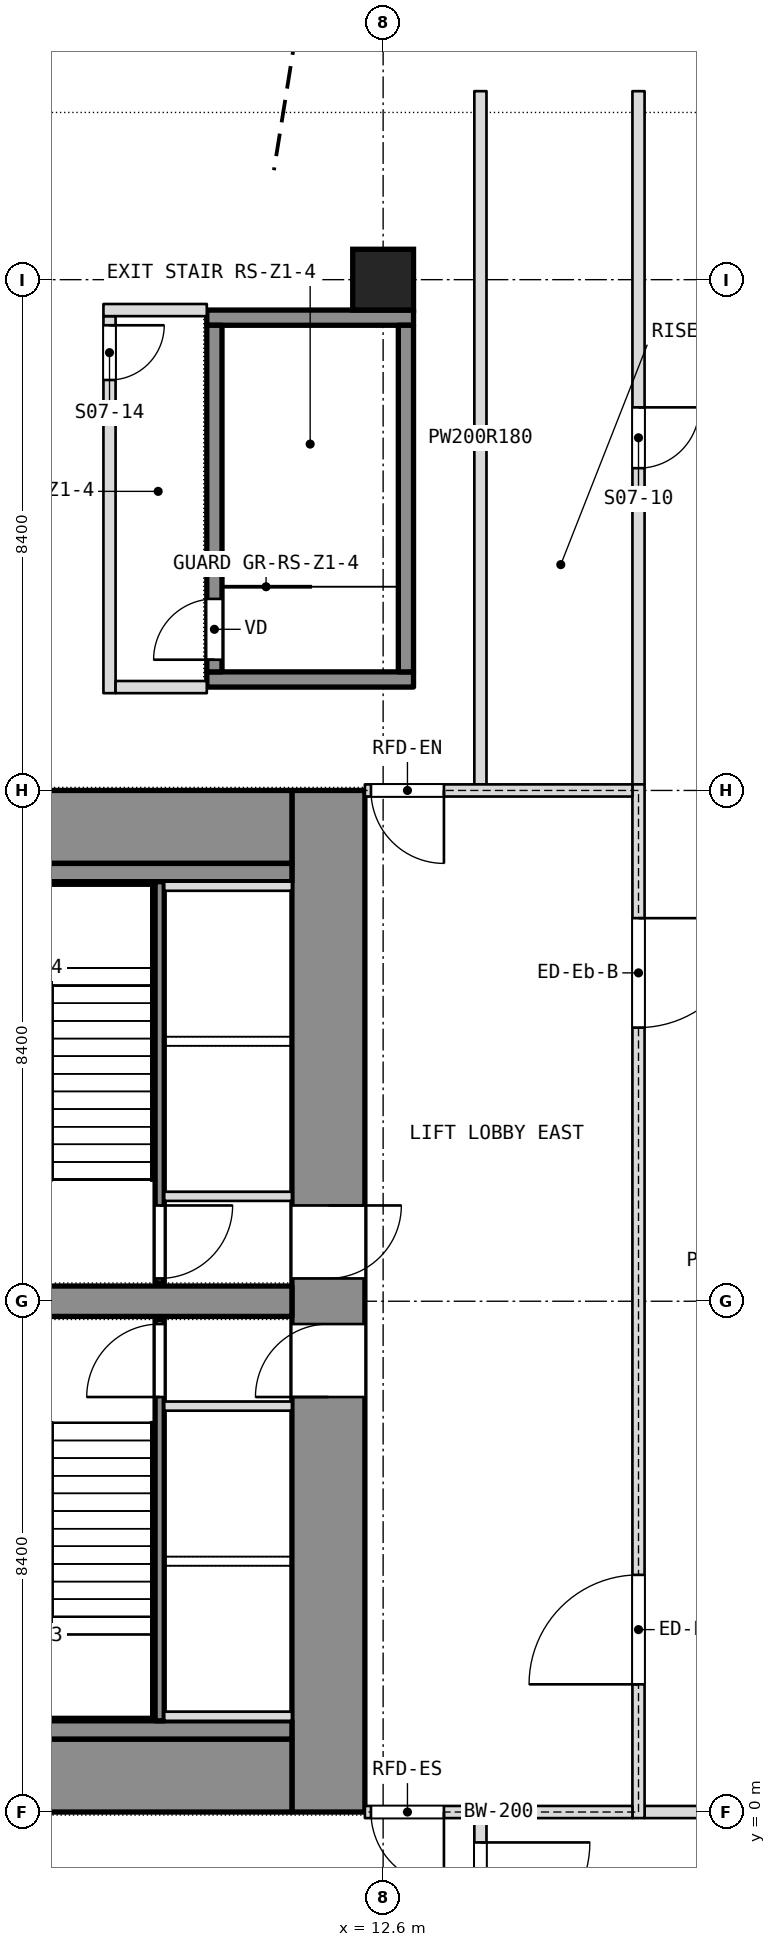
"""IFC4 building model, lengths in metres.
Left out: names, types, materials, properties, quantities, classifications, styles, units other than length and angle.
Written with IfcOpenShell. Run it as: python <this file> out.ifc"""

import sys

from ifc_helpers import new_model, si_unit, direction, frame, frame_2d, origin, origin_2d, place, context, subcontext, project, spatial, rectangle, extrude, element, fill, save


model = new_model("IFC4")
c1 = context("Model", 3, precision=1e-05, world=origin(), true_north=direction((0.0, 1.0)))
c2 = subcontext(c1, "Body", "Model", "MODEL_VIEW")
j1 = project(units=[si_unit("LENGTHUNIT", "METRE"), si_unit("PLANEANGLEUNIT", "RADIAN")], contexts=[c1])
p1 = place(None, origin())
s1 = spatial("IfcSite", under=j1, at=p1, CompositionType="ELEMENT")
p2 = place(p1, origin())
s2 = spatial("IfcBuilding", under=s1, at=p2, CompositionType="ELEMENT")
p3 = place(p2, frame((0.0, 0.0, 86.9)))
s3 = spatial("IfcBuildingStorey", under=s2, at=p3, CompositionType="ELEMENT", Elevation=86.9)
p4 = place(p3, frame((11.7, 0.0, 0.0), z_axis=(0.0, 0.0, 1.0), x_axis=(0.0, 1.0, 0.0)))
e1 = element("IfcWall", 1, at=p4, inside=s3, PredefinedType="SHEAR", context=c2, shape_type="SweptSolid", body=[
    extrude(rectangle(XDim=16.8, YDim=1.2, at=frame_2d((8.4, 0.0))), origin(), (0.0, 0.0, 1.0), 10.8),
])
p5 = place(p4, frame((6.825, 0.0, 0.0)))
e2 = element("IfcOpeningElement", 2, at=p5, cuts=e1, PredefinedType="OPENING", context=c2, shape_type="SweptSolid", body=[
    extrude(rectangle(XDim=1.2, YDim=2.1, at=frame_2d((0.6, 1.05))), frame((0.0, 0.6, 0.0), z_axis=(0.0, -1.0, 0.0), x_axis=(1.0, 0.0, 0.0)), (0.0, 0.0, 1.0), 1.2),
])
p6 = place(p4, frame((8.775, 0.0, 0.0)))
e3 = element("IfcOpeningElement", 3, at=p6, cuts=e1, PredefinedType="OPENING", context=c2, shape_type="SweptSolid", body=[
    extrude(rectangle(XDim=1.2, YDim=2.1, at=frame_2d((0.6, 1.05))), frame((0.0, 0.6, 0.0), z_axis=(0.0, -1.0, 0.0), x_axis=(1.0, 0.0, 0.0)), (0.0, 0.0, 1.0), 1.2),
])
p7 = place(p3, frame((-11.1, 0.6, 0.0), z_axis=(0.0, 0.0, 1.0), x_axis=(1.0, 0.0, 0.0)))
e4 = element("IfcWall", 4, at=p7, inside=s3, PredefinedType="SHEAR", context=c2, shape_type="SweptSolid", body=[
    extrude(rectangle(XDim=22.2, YDim=1.2, at=frame_2d((11.1, 0.0))), origin(), (0.0, 0.0, 1.0), 10.8),
])
p8 = place(p7, frame((10.85, 0.0, 0.0)))
e5 = element("IfcOpeningElement", 5, at=p8, cuts=e4, PredefinedType="OPENING", context=c2, shape_type="SweptSolid", body=[
    extrude(rectangle(XDim=1.4, YDim=2.1, at=frame_2d((0.7, 1.05))), frame((0.0, 0.6, 0.0), z_axis=(0.0, -1.0, 0.0), x_axis=(1.0, 0.0, 0.0)), (0.0, 0.0, 1.0), 1.2),
])
p9 = place(p3, frame((-11.1, 16.2, 0.0), z_axis=(0.0, 0.0, 1.0), x_axis=(1.0, 0.0, 0.0)))
e6 = element("IfcWall", 6, at=p9, inside=s3, PredefinedType="SHEAR", context=c2, shape_type="SweptSolid", body=[
    extrude(rectangle(XDim=22.2, YDim=1.2, at=frame_2d((11.1, 0.0))), origin(), (0.0, 0.0, 1.0), 10.8),
])
p10 = place(p9, frame((10.4, 0.0, 0.0)))
e7 = element("IfcOpeningElement", 7, at=p10, cuts=e6, PredefinedType="OPENING", context=c2, shape_type="SweptSolid", body=[
    extrude(rectangle(XDim=1.4, YDim=2.1, at=frame_2d((0.7, 1.05))), frame((0.0, 0.6, 0.0), z_axis=(0.0, -1.0, 0.0), x_axis=(1.0, 0.0, 0.0)), (0.0, 0.0, 1.0), 1.2),
])
p11 = place(p3, frame((4.45, 8.4, 0.0), z_axis=(0.0, 0.0, 1.0), x_axis=(1.0, 0.0, 0.0)))
e8 = element("IfcWall", 8, at=p11, inside=s3, PredefinedType="SHEAR", context=c2, shape_type="SweptSolid", body=[
    extrude(rectangle(XDim=6.65, YDim=0.5, at=frame_2d((3.325, 0.0))), origin(), (0.0, 0.0, 1.0), 10.8),
])
p12 = place(p3, frame((12.6, 25.2, 0.0), z_axis=(0.0, 0.0, 1.0), x_axis=(1.0, 0.0, 0.0)))
e9 = element("IfcColumn", 9, at=p12, inside=s3, PredefinedType="COLUMN", context=c2, shape_type="SweptSolid", body=[
    extrude(rectangle(XDim=1.0, YDim=1.0, at=origin_2d()), origin(), (0.0, 0.0, 1.0), 10.54),
])
p13 = place(p3, frame((16.8, 16.9, 0.0), z_axis=(0.0, 0.0, 1.0), x_axis=(0.0, 1.0, 0.0)))
e10 = element("IfcWall", 10, at=p13, inside=s3, PredefinedType="PARTITIONING", context=c2, shape_type="SweptSolid", body=[
    extrude(rectangle(XDim=11.4, YDim=0.2, at=frame_2d((5.7, 0.0))), origin(), (0.0, 0.0, 1.0), 10.14),
])
p14 = place(p13, frame((5.2, 0.0, 0.0)))
e11 = element("IfcOpeningElement", 11, at=p14, cuts=e10, PredefinedType="OPENING", context=c2, shape_type="SweptSolid", body=[
    extrude(rectangle(XDim=1.0, YDim=2.1, at=frame_2d((0.5, 1.05))), frame((0.0, 0.1, 0.0), z_axis=(0.0, -1.0, 0.0), x_axis=(1.0, 0.0, 0.0)), (0.0, 0.0, 1.0), 0.2),
])
p15 = place(p3, frame((14.2, -17.699, 0.0), z_axis=(0.0, 0.0, 1.0), x_axis=(0.0, 1.0, 0.0)))
e12 = element("IfcWall", 12, at=p15, inside=s3, PredefinedType="PARTITIONING", context=c2, shape_type="SweptSolid", body=[
    extrude(rectangle(XDim=17.599, YDim=0.2, at=frame_2d((8.799, 0.0))), origin(), (0.0, 0.0, 1.0), 10.54),
])
p16 = place(p15, frame((15.399, 0.0, 0.0)))
e13 = element("IfcOpeningElement", 13, at=p16, cuts=e12, PredefinedType="OPENING", context=c2, shape_type="SweptSolid", body=[
    extrude(rectangle(XDim=1.8, YDim=2.1, at=frame_2d((0.9, 1.05))), frame((0.0, 0.1, 0.0), z_axis=(0.0, -1.0, 0.0), x_axis=(1.0, 0.0, 0.0)), (0.0, 0.0, 1.0), 0.2),
])
p17 = place(p3, frame((14.2, 16.9, 0.0), z_axis=(0.0, 0.0, 1.0), x_axis=(0.0, 1.0, 0.0)))
e14 = element("IfcWall", 14, at=p17, inside=s3, PredefinedType="PARTITIONING", context=c2, shape_type="SweptSolid", body=[
    extrude(rectangle(XDim=11.4, YDim=0.2, at=frame_2d((5.7, 0.0))), origin(), (0.0, 0.0, 1.0), 10.54),
])
p18 = place(p3, frame((8.1, 18.4, 0.0), z_axis=(0.0, 0.0, 1.0), x_axis=(0.0, 1.0, 0.0)))
e15 = element("IfcWall", 15, at=p18, inside=s3, PredefinedType="PARTITIONING", context=c2, shape_type="SweptSolid", body=[
    extrude(rectangle(XDim=6.2, YDim=0.2, at=frame_2d((3.1, 0.0))), origin(), (0.0, 0.0, 1.0), 10.54),
])
p19 = place(p18, frame((5.15, 0.0, 0.0)))
e16 = element("IfcOpeningElement", 16, at=p19, cuts=e15, PredefinedType="OPENING", context=c2, shape_type="SweptSolid", body=[
    extrude(rectangle(XDim=0.9, YDim=2.1, at=frame_2d((0.45, 1.05))), frame((0.0, 0.1, 0.0), z_axis=(0.0, -1.0, 0.0), x_axis=(1.0, 0.0, 0.0)), (0.0, 0.0, 1.0), 0.2),
])
p20 = place(p3, frame((16.9, 0.0, 0.0), z_axis=(0.0, 0.0, 1.0), x_axis=(1.0, 0.0, 0.0)))
e17 = element("IfcWall", 17, at=p20, inside=s3, PredefinedType="PARTITIONING", context=c2, shape_type="SweptSolid", body=[
    extrude(rectangle(XDim=4.0, YDim=0.2, at=frame_2d((2.0, 0.0))), origin(), (0.0, 0.0, 1.0), 10.09),
])
p21 = place(p3, frame((8.2, 18.5, 0.0), z_axis=(0.0, 0.0, 1.0), x_axis=(1.0, 0.0, 0.0)))
e18 = element("IfcWall", 18, at=p21, inside=s3, PredefinedType="PARTITIONING", context=c2, shape_type="SweptSolid", body=[
    extrude(rectangle(XDim=1.5, YDim=0.2, at=frame_2d((0.75, 0.0))), origin(), (0.0, 0.0, 1.0), 10.54),
])
p22 = place(p3, frame((8.0, 24.7, 0.0), z_axis=(0.0, 0.0, 1.0), x_axis=(1.0, 0.0, 0.0)))
e19 = element("IfcWall", 19, at=p22, inside=s3, PredefinedType="PARTITIONING", context=c2, shape_type="SweptSolid", body=[
    extrude(rectangle(XDim=1.7, YDim=0.2, at=frame_2d((0.85, 0.0))), origin(), (0.0, 0.0, 1.0), 10.54),
])
p23 = place(p3, frame((1.15, 1.35, 0.0), z_axis=(0.0, 0.0, 1.0), x_axis=(1.0, 0.0, 0.0)))
e20 = element("IfcWall", 20, at=p23, inside=s3, PredefinedType="PARTITIONING", context=c2, shape_type="SweptSolid", body=[
    extrude(rectangle(XDim=9.95, YDim=0.3, at=frame_2d((4.975, 0.0))), origin(), (0.0, 0.0, 1.0), 10.54),
])
p24 = place(p3, frame((0.9, 15.45, 0.0), z_axis=(0.0, 0.0, 1.0), x_axis=(1.0, 0.0, 0.0)))
e21 = element("IfcWall", 21, at=p24, inside=s3, PredefinedType="PARTITIONING", context=c2, shape_type="SweptSolid", body=[
    extrude(rectangle(XDim=10.2, YDim=0.3, at=frame_2d((5.1, 0.0))), origin(), (0.0, 0.0, 1.0), 10.54),
])
p25 = place(p3, frame((8.925, 1.5, 0.0), z_axis=(0.0, 0.0, 1.0), x_axis=(0.0, 1.0, 0.0)))
e22 = element("IfcWall", 22, at=p25, inside=s3, PredefinedType="SHEAR", context=c2, shape_type="SweptSolid", body=[
    extrude(rectangle(XDim=6.6, YDim=0.15, at=frame_2d((3.3, 0.0))), origin(), (0.0, 0.0, 1.0), 10.54),
])
p26 = place(p25, frame((5.325, 0.0, 0.0)))
e23 = element("IfcOpeningElement", 23, at=p26, cuts=e22, PredefinedType="OPENING", context=c2, shape_type="SweptSolid", body=[
    extrude(rectangle(XDim=1.2, YDim=2.1, at=frame_2d((0.6, 1.05))), frame((0.0, 0.075, 0.0), z_axis=(0.0, -1.0, 0.0), x_axis=(1.0, 0.0, 0.0)), (0.0, 0.0, 1.0), 0.15),
])
for number, where, z_axis, x_axis in (
    (24, (9.0, 6.675, 0.0), (0.0, 0.0, 1.0), (1.0, 0.0, 0.0)),
    (25, (9.0, 1.575, 0.0), (0.0, 0.0, 1.0), (1.0, 0.0, 0.0)),
):
    element("IfcWall", number, at=place(p3, frame(where, z_axis=z_axis, x_axis=x_axis)), inside=s3, PredefinedType="SHEAR", context=c2, shape_type="SweptSolid", body=[
        extrude(rectangle(XDim=2.1, YDim=0.15, at=frame_2d((1.05, 0.0))), origin(), (0.0, 0.0, 1.0), 10.8),
    ])
p27 = place(p3, frame((8.925, 8.7, 0.0), z_axis=(0.0, 0.0, 1.0), x_axis=(0.0, 1.0, 0.0)))
e26 = element("IfcWall", 26, at=p27, inside=s3, PredefinedType="SHEAR", context=c2, shape_type="SweptSolid", body=[
    extrude(rectangle(XDim=6.6, YDim=0.15, at=frame_2d((3.3, 0.0))), origin(), (0.0, 0.0, 1.0), 10.54),
])
p28 = place(p27, frame((0.075, 0.0, 0.0)))
e27 = element("IfcOpeningElement", 27, at=p28, cuts=e26, PredefinedType="OPENING", context=c2, shape_type="SweptSolid", body=[
    extrude(rectangle(XDim=1.2, YDim=2.1, at=frame_2d((0.6, 1.05))), frame((0.0, 0.075, 0.0), z_axis=(0.0, -1.0, 0.0), x_axis=(1.0, 0.0, 0.0)), (0.0, 0.0, 1.0), 0.15),
])
for number, where, z_axis, x_axis in (
    (28, (9.0, 10.125, 0.0), (0.0, 0.0, 1.0), (1.0, 0.0, 0.0)),
    (29, (9.0, 15.225, 0.0), (0.0, 0.0, 1.0), (1.0, 0.0, 0.0)),
):
    element("IfcWall", number, at=place(p3, frame(where, z_axis=z_axis, x_axis=x_axis)), inside=s3, PredefinedType="SHEAR", context=c2, shape_type="SweptSolid", body=[
        extrude(rectangle(XDim=2.1, YDim=0.15, at=frame_2d((1.05, 0.0))), origin(), (0.0, 0.0, 1.0), 10.8),
    ])
p29 = place(p3, frame((16.8, -0.1, 0.0), z_axis=(0.0, 0.0, 1.0), x_axis=(0.0, 1.0, 0.0)))
e30 = element("IfcWall", 30, at=p29, inside=s3, PredefinedType="PARTITIONING", context=c2, shape_type="SweptSolid", body=[
    extrude(rectangle(XDim=17.0, YDim=0.2, at=frame_2d((8.5, 0.0))), origin(), (0.0, 0.0, 1.0), 10.54),
])
p30 = place(p29, frame((2.2, 0.0, 0.0)))
e31 = element("IfcOpeningElement", 31, at=p30, cuts=e30, PredefinedType="OPENING", context=c2, shape_type="SweptSolid", body=[
    extrude(rectangle(XDim=1.8, YDim=2.1, at=frame_2d((0.9, 1.05))), frame((0.0, 0.1, 0.0), z_axis=(0.0, -1.0, 0.0), x_axis=(1.0, 0.0, 0.0)), (0.0, 0.0, 1.0), 0.2),
])
p31 = place(p29, frame((13.0, 0.0, 0.0)))
e32 = element("IfcOpeningElement", 32, at=p31, cuts=e30, PredefinedType="OPENING", context=c2, shape_type="SweptSolid", body=[
    extrude(rectangle(XDim=1.8, YDim=2.1, at=frame_2d((0.9, 1.05))), frame((0.0, 0.1, 0.0), z_axis=(0.0, -1.0, 0.0), x_axis=(1.0, 0.0, 0.0)), (0.0, 0.0, 1.0), 0.2),
])
p32 = place(p3, frame((12.3, 0.0, 0.0), z_axis=(0.0, 0.0, 1.0), x_axis=(1.0, 0.0, 0.0)))
e33 = element("IfcWall", 33, at=p32, inside=s3, PredefinedType="PARTITIONING", context=c2, shape_type="SweptSolid", body=[
    extrude(rectangle(XDim=4.4, YDim=0.2, at=frame_2d((2.2, 0.0))), origin(), (0.0, 0.0, 1.0), 10.09),
])
p33 = place(p32, frame((0.1, 0.0, 0.0)))
e34 = element("IfcOpeningElement", 34, at=p33, cuts=e33, PredefinedType="OPENING", context=c2, shape_type="SweptSolid", body=[
    extrude(rectangle(XDim=1.2, YDim=2.1, at=frame_2d((0.6, 1.05))), frame((0.0, 0.1, 0.0), z_axis=(0.0, -1.0, 0.0), x_axis=(1.0, 0.0, 0.0)), (0.0, 0.0, 1.0), 0.2),
])
p34 = place(p3, frame((12.3, 16.8, 0.0), z_axis=(0.0, 0.0, 1.0), x_axis=(1.0, 0.0, 0.0)))
e35 = element("IfcWall", 35, at=p34, inside=s3, PredefinedType="PARTITIONING", context=c2, shape_type="SweptSolid", body=[
    extrude(rectangle(XDim=4.4, YDim=0.2, at=frame_2d((2.2, 0.0))), origin(), (0.0, 0.0, 1.0), 10.09),
])
p35 = place(p34, frame((0.1, 0.0, 0.0)))
e36 = element("IfcOpeningElement", 36, at=p35, cuts=e35, PredefinedType="OPENING", context=c2, shape_type="SweptSolid", body=[
    extrude(rectangle(XDim=1.2, YDim=2.1, at=frame_2d((0.6, 1.05))), frame((0.0, 0.1, 0.0), z_axis=(0.0, -1.0, 0.0), x_axis=(1.0, 0.0, 0.0)), (0.0, 0.0, 1.0), 0.2),
])
for number, where, z_axis, x_axis in (
    (37, (9.7, 18.625, 0.1), (0.0, 0.0, 1.0), (1.0, 0.0, 0.0)),
    (38, (9.7, 24.575, 0.1), (0.0, 0.0, 1.0), (1.0, 0.0, 0.0)),
):
    element("IfcWall", number, at=place(p3, frame(where, z_axis=z_axis, x_axis=x_axis)), inside=s3, PredefinedType="SHEAR", context=c2, shape_type="SweptSolid", body=[
        extrude(rectangle(XDim=3.4, YDim=0.25, at=frame_2d((1.7, 0.0))), origin(), (0.0, 0.0, 1.0), 10.44),
    ])
p36 = place(p3, frame((9.825, 18.75, 0.1), z_axis=(0.0, 0.0, 1.0), x_axis=(0.0, 1.0, 0.0)))
e39 = element("IfcWall", 39, at=p36, inside=s3, PredefinedType="SHEAR", context=c2, shape_type="SweptSolid", body=[
    extrude(rectangle(XDim=5.7, YDim=0.25, at=frame_2d((2.85, 0.0))), origin(), (0.0, 0.0, 1.0), 10.44),
])
p37 = place(p36, frame((0.2, 0.0, 0.0)))
e40 = element("IfcOpeningElement", 40, at=p37, cuts=e39, PredefinedType="OPENING", context=c2, shape_type="SweptSolid", body=[
    extrude(rectangle(XDim=1.0, YDim=2.1, at=frame_2d((0.5, 1.05))), frame((0.0, 0.125, 0.0), z_axis=(0.0, -1.0, 0.0), x_axis=(1.0, 0.0, 0.0)), (0.0, 0.0, 1.0), 0.25),
])
p38 = place(p3, frame((12.975, 18.75, 0.1), z_axis=(0.0, 0.0, 1.0), x_axis=(0.0, 1.0, 0.0)))
e41 = element("IfcWall", 41, at=p38, inside=s3, PredefinedType="SHEAR", context=c2, shape_type="SweptSolid", body=[
    extrude(rectangle(XDim=5.7, YDim=0.25, at=frame_2d((2.85, 0.0))), origin(), (0.0, 0.0, 1.0), 10.44),
])
p39 = place(p14, origin())
e42 = element("IfcDoor", 42, at=p39, inside=s3, OperationType="SINGLE_SWING_RIGHT", PredefinedType="DOOR", context=c2, shape_type="SweptSolid", body=[
    extrude(rectangle(XDim=1.0, YDim=2.1, at=frame_2d((0.5, 1.05))), frame((0.0, 0.025, 0.0), z_axis=(0.0, -1.0, 0.0), x_axis=(1.0, 0.0, 0.0)), (0.0, 0.0, 1.0), 0.05),
])
fill(e11, e42)
p40 = place(p16, origin())
e43 = element("IfcDoor", 43, at=p40, inside=s3, OperationType="DOUBLE_DOOR_SINGLE_SWING", PredefinedType="DOOR", context=c2, shape_type="SweptSolid", body=[
    extrude(rectangle(XDim=1.8, YDim=2.1, at=frame_2d((0.9, 1.05))), frame((0.0, 0.025, 0.0), z_axis=(0.0, -1.0, 0.0), x_axis=(1.0, 0.0, 0.0)), (0.0, 0.0, 1.0), 0.05),
])
fill(e13, e43)
p41 = place(p19, origin())
e44 = element("IfcDoor", 44, at=p41, inside=s3, OperationType="SINGLE_SWING_LEFT", PredefinedType="DOOR", context=c2, shape_type="SweptSolid", body=[
    extrude(rectangle(XDim=0.9, YDim=2.1, at=frame_2d((0.45, 1.05))), frame((0.0, 0.025, 0.0), z_axis=(0.0, -1.0, 0.0), x_axis=(1.0, 0.0, 0.0)), (0.0, 0.0, 1.0), 0.05),
])
fill(e16, e44)
p42 = place(p37, origin())
e45 = element("IfcDoor", 45, at=p42, inside=s3, OperationType="SINGLE_SWING_LEFT", PredefinedType="DOOR", context=c2, shape_type="SweptSolid", body=[
    extrude(rectangle(XDim=1.0, YDim=2.1, at=frame_2d((0.5, 1.05))), frame((0.0, 0.025, 0.0), z_axis=(0.0, -1.0, 0.0), x_axis=(1.0, 0.0, 0.0)), (0.0, 0.0, 1.0), 0.05),
])
fill(e40, e45)
p43 = place(p5, origin())
e46 = element("IfcDoor", 46, at=p43, inside=s3, OperationType="SINGLE_SWING_LEFT", PredefinedType="DOOR", context=c2, shape_type="SweptSolid", body=[
    extrude(rectangle(XDim=1.2, YDim=2.1, at=frame_2d((0.6, 1.05))), frame((0.0, 0.025, 0.0), z_axis=(0.0, -1.0, 0.0), x_axis=(1.0, 0.0, 0.0)), (0.0, 0.0, 1.0), 0.05),
])
fill(e2, e46)
p44 = place(p26, origin())
e47 = element("IfcDoor", 47, at=p44, inside=s3, OperationType="SINGLE_SWING_LEFT", PredefinedType="DOOR", context=c2, shape_type="SweptSolid", body=[
    extrude(rectangle(XDim=1.2, YDim=2.1, at=frame_2d((0.6, 1.05))), frame((0.0, 0.025, 0.0), z_axis=(0.0, -1.0, 0.0), x_axis=(1.0, 0.0, 0.0)), (0.0, 0.0, 1.0), 0.05),
])
fill(e23, e47)
p45 = place(p6, origin())
e48 = element("IfcDoor", 48, at=p45, inside=s3, OperationType="SINGLE_SWING_LEFT", PredefinedType="DOOR", context=c2, shape_type="SweptSolid", body=[
    extrude(rectangle(XDim=1.2, YDim=2.1, at=frame_2d((0.6, 1.05))), frame((0.0, 0.025, 0.0), z_axis=(0.0, -1.0, 0.0), x_axis=(1.0, 0.0, 0.0)), (0.0, 0.0, 1.0), 0.05),
])
fill(e3, e48)
p46 = place(p28, origin())
e49 = element("IfcDoor", 49, at=p46, inside=s3, OperationType="SINGLE_SWING_LEFT", PredefinedType="DOOR", context=c2, shape_type="SweptSolid", body=[
    extrude(rectangle(XDim=1.2, YDim=2.1, at=frame_2d((0.6, 1.05))), frame((0.0, 0.025, 0.0), z_axis=(0.0, -1.0, 0.0), x_axis=(1.0, 0.0, 0.0)), (0.0, 0.0, 1.0), 0.05),
])
fill(e27, e49)
p47 = place(p30, origin())
e50 = element("IfcDoor", 50, at=p47, inside=s3, OperationType="DOUBLE_DOOR_SINGLE_SWING", PredefinedType="DOOR", context=c2, shape_type="SweptSolid", body=[
    extrude(rectangle(XDim=1.8, YDim=2.1, at=frame_2d((0.9, 1.05))), frame((0.0, 0.025, 0.0), z_axis=(0.0, -1.0, 0.0), x_axis=(1.0, 0.0, 0.0)), (0.0, 0.0, 1.0), 0.05),
])
fill(e31, e50)
p48 = place(p31, origin())
e51 = element("IfcDoor", 51, at=p48, inside=s3, OperationType="DOUBLE_DOOR_SINGLE_SWING", PredefinedType="DOOR", context=c2, shape_type="SweptSolid", body=[
    extrude(rectangle(XDim=1.8, YDim=2.1, at=frame_2d((0.9, 1.05))), frame((0.0, 0.025, 0.0), z_axis=(0.0, -1.0, 0.0), x_axis=(1.0, 0.0, 0.0)), (0.0, 0.0, 1.0), 0.05),
])
fill(e32, e51)
p49 = place(p33, origin())
e52 = element("IfcDoor", 52, at=p49, inside=s3, OperationType="SINGLE_SWING_LEFT", PredefinedType="DOOR", context=c2, shape_type="SweptSolid", body=[
    extrude(rectangle(XDim=1.2, YDim=2.1, at=frame_2d((0.6, 1.05))), frame((0.0, 0.025, 0.0), z_axis=(0.0, -1.0, 0.0), x_axis=(1.0, 0.0, 0.0)), (0.0, 0.0, 1.0), 0.05),
])
fill(e34, e52)
p50 = place(p35, origin())
e53 = element("IfcDoor", 53, at=p50, inside=s3, OperationType="SINGLE_SWING_LEFT", PredefinedType="DOOR", context=c2, shape_type="SweptSolid", body=[
    extrude(rectangle(XDim=1.2, YDim=2.1, at=frame_2d((0.6, 1.05))), frame((0.0, 0.025, 0.0), z_axis=(0.0, -1.0, 0.0), x_axis=(1.0, 0.0, 0.0)), (0.0, 0.0, 1.0), 0.05),
])
fill(e36, e53)
save(model, sys.argv[1])
